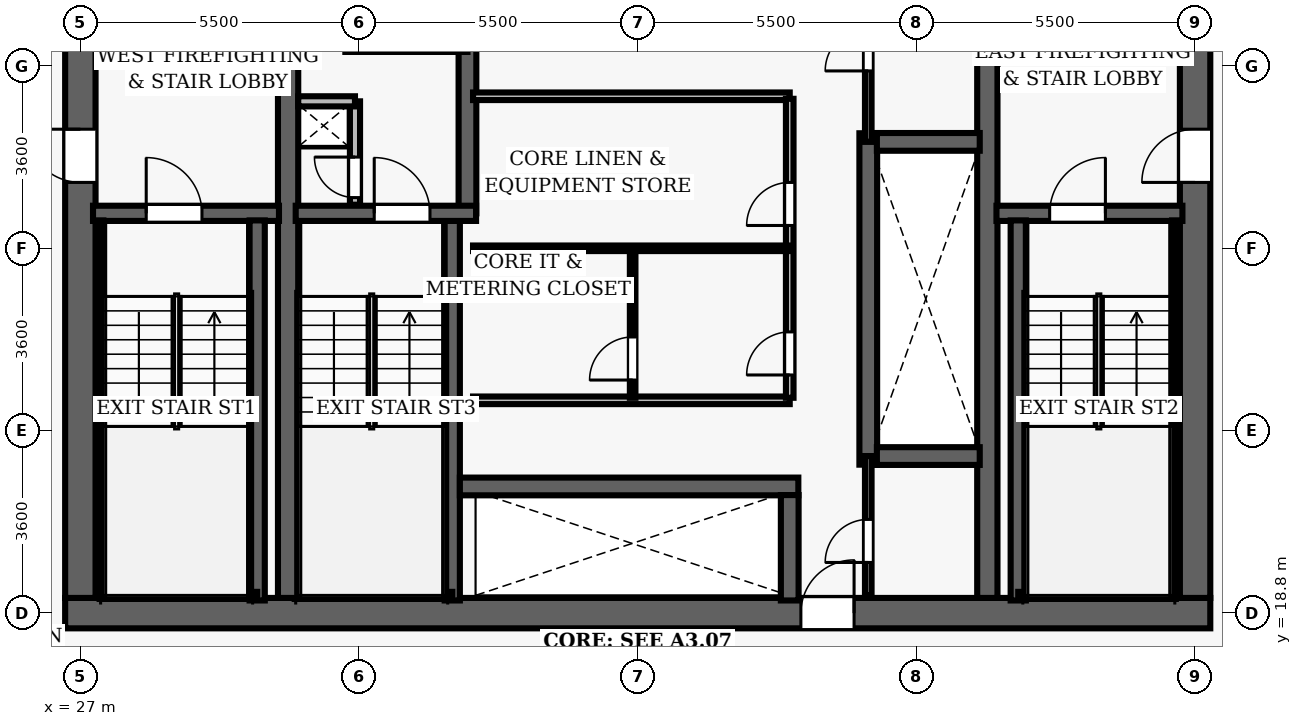
"""IFC4 building model, lengths in metres.
Left out: names, types, materials, properties, quantities, classifications, styles, units other than length and angle.
Written with IfcOpenShell. Run it as: python <this file> out.ifc"""

import sys

from ifc_helpers import new_model, si_unit, direction, frame, frame_2d, origin, place, context, subcontext, project, spatial, rectangle, extrude, element, fill, save


model = new_model("IFC4")
c1 = context("Model", 3, precision=1e-05, world=origin(), true_north=direction((0.0, 1.0)))
c2 = subcontext(c1, "Body", "Model", "MODEL_VIEW")
j1 = project(units=[si_unit("LENGTHUNIT", "METRE"), si_unit("PLANEANGLEUNIT", "RADIAN")], contexts=[c1])
p1 = place(None, origin())
s1 = spatial("IfcSite", under=j1, at=p1, CompositionType="ELEMENT")
p2 = place(p1, origin())
s2 = spatial("IfcBuilding", under=s1, at=p2, CompositionType="ELEMENT")
p3 = place(p2, frame((0.0, 0.0, 83.4)))
s3 = spatial("IfcBuildingStorey", under=s2, at=p3, CompositionType="ELEMENT", Elevation=83.4)
p4 = place(p3, frame((26.7, 18.8, 0.0), z_axis=(0.0, 0.0, 1.0), x_axis=(1.0, 0.0, 0.0)))
e1 = element("IfcWall", 1, at=p4, inside=s3, PredefinedType="SHEAR", context=c2, shape_type="SweptSolid", body=[
    extrude(rectangle(XDim=22.6, YDim=0.6, at=frame_2d((11.3, 0.0))), origin(), (0.0, 0.0, 1.0), 3.5),
])
p5 = place(p4, frame((14.52, 0.0, 0.0)))
e2 = element("IfcOpeningElement", 2, at=p5, cuts=e1, PredefinedType="OPENING", context=c2, shape_type="SweptSolid", body=[
    extrude(rectangle(XDim=1.05, YDim=2.15, at=frame_2d((0.525, 1.075))), frame((0.0, 0.31, 0.0), z_axis=(0.0, -1.0, 0.0), x_axis=(1.0, 0.0, 0.0)), (0.0, 0.0, 1.0), 0.62),
])
p6 = place(p3, frame((27.0, 19.1, 0.0), z_axis=(0.0, 0.0, 1.0), x_axis=(0.0, 1.0, 0.0)))
e3 = element("IfcWall", 3, at=p6, inside=s3, PredefinedType="SHEAR", context=c2, shape_type="SweptSolid", body=[
    extrude(rectangle(XDim=13.8, YDim=0.6, at=frame_2d((6.9, 0.0))), origin(), (0.0, 0.0, 1.0), 3.5),
])
p7 = place(p6, frame((8.2, 0.0, 0.0)))
e4 = element("IfcOpeningElement", 4, at=p7, cuts=e3, PredefinedType="OPENING", context=c2, shape_type="SweptSolid", body=[
    extrude(rectangle(XDim=1.05, YDim=2.15, at=frame_2d((0.525, 1.075))), frame((0.0, 0.31, 0.0), z_axis=(0.0, -1.0, 0.0), x_axis=(1.0, 0.0, 0.0)), (0.0, 0.0, 1.0), 0.62),
])
p8 = place(p3, frame((49.0, 19.1, 0.0), z_axis=(0.0, 0.0, 1.0), x_axis=(0.0, 1.0, 0.0)))
e5 = element("IfcWall", 5, at=p8, inside=s3, PredefinedType="SHEAR", context=c2, shape_type="SweptSolid", body=[
    extrude(rectangle(XDim=13.8, YDim=0.6, at=frame_2d((6.9, 0.0))), origin(), (0.0, 0.0, 1.0), 3.5),
])
p9 = place(p8, frame((8.2, 0.0, 0.0)))
e6 = element("IfcOpeningElement", 6, at=p9, cuts=e5, PredefinedType="OPENING", context=c2, shape_type="SweptSolid", body=[
    extrude(rectangle(XDim=1.05, YDim=2.15, at=frame_2d((0.525, 1.075))), frame((0.0, 0.31, 0.0), z_axis=(0.0, -1.0, 0.0), x_axis=(1.0, 0.0, 0.0)), (0.0, 0.0, 1.0), 0.62),
])
for number, where, z_axis, x_axis in (
    (7, (31.1, 19.1, 0.0), (0.0, 0.0, 1.0), (0.0, 1.0, 0.0)),
    (8, (44.9, 19.1, 0.0), (0.0, 0.0, 1.0), (0.0, 1.0, 0.0)),
):
    element("IfcWall", number, at=place(p3, frame(where, z_axis=z_axis, x_axis=x_axis)), inside=s3, PredefinedType="SHEAR", context=c2, shape_type="SweptSolid", body=[
        extrude(rectangle(XDim=13.8, YDim=0.4, at=frame_2d((6.9, 0.0))), origin(), (0.0, 0.0, 1.0), 3.5),
    ])
p10 = place(p3, frame((27.25, 26.69, 0.0), z_axis=(0.0, 0.0, 1.0), x_axis=(1.0, 0.0, 0.0)))
e9 = element("IfcWall", 9, at=p10, inside=s3, PredefinedType="SHEAR", context=c2, shape_type="SweptSolid", body=[
    extrude(rectangle(XDim=3.67, YDim=0.3, at=frame_2d((1.835, 0.0))), origin(), (0.0, 0.0, 1.0), 3.5),
])
p11 = place(p10, frame((1.05, 0.0, 0.0)))
e10 = element("IfcOpeningElement", 10, at=p11, cuts=e9, PredefinedType="OPENING", context=c2, shape_type="SweptSolid", body=[
    extrude(rectangle(XDim=1.1, YDim=2.15, at=frame_2d((0.55, 1.075))), frame((0.0, 0.16, 0.0), z_axis=(0.0, -1.0, 0.0), x_axis=(1.0, 0.0, 0.0)), (0.0, 0.0, 1.0), 0.32),
])
p12 = place(p3, frame((30.49, 19.05, 0.0), z_axis=(0.0, 0.0, 1.0), x_axis=(0.0, 1.0, 0.0)))
e11 = element("IfcWall", 11, at=p12, inside=s3, PredefinedType="SHEAR", context=c2, shape_type="SweptSolid", body=[
    extrude(rectangle(XDim=7.5, YDim=0.3, at=frame_2d((3.75, 0.0))), origin(), (0.0, 0.0, 1.0), 3.5),
])
p13 = place(p3, frame((27.395, 19.1, 0.0), z_axis=(0.0, 0.0, 1.0), x_axis=(0.0, 1.0, 0.0)))
e12 = element("IfcWall", 12, at=p13, inside=s3, PredefinedType="SHEAR", context=c2, shape_type="SweptSolid", body=[
    extrude(rectangle(XDim=7.45, YDim=0.12, at=frame_2d((3.725, 0.0))), origin(), (0.0, 0.0, 1.0), 3.5),
])
p14 = place(p3, frame((27.395, 19.16, 0.0), z_axis=(0.0, 0.0, 1.0), x_axis=(1.0, 0.0, 0.0)))
e13 = element("IfcWall", 13, at=p14, inside=s3, PredefinedType="SHEAR", context=c2, shape_type="SweptSolid", body=[
    extrude(rectangle(XDim=3.095, YDim=0.12, at=frame_2d((1.547, 0.0))), origin(), (0.0, 0.0, 1.0), 3.5),
])
p15 = place(p3, frame((45.08, 26.69, 0.0), z_axis=(0.0, 0.0, 1.0), x_axis=(1.0, 0.0, 0.0)))
e14 = element("IfcWall", 14, at=p15, inside=s3, PredefinedType="SHEAR", context=c2, shape_type="SweptSolid", body=[
    extrude(rectangle(XDim=3.67, YDim=0.3, at=frame_2d((1.835, 0.0))), origin(), (0.0, 0.0, 1.0), 3.5),
])
p16 = place(p15, frame((1.05, 0.0, 0.0)))
e15 = element("IfcOpeningElement", 15, at=p16, cuts=e14, PredefinedType="OPENING", context=c2, shape_type="SweptSolid", body=[
    extrude(rectangle(XDim=1.1, YDim=2.15, at=frame_2d((0.55, 1.075))), frame((0.0, 0.16, 0.0), z_axis=(0.0, -1.0, 0.0), x_axis=(1.0, 0.0, 0.0)), (0.0, 0.0, 1.0), 0.32),
])
p17 = place(p3, frame((45.51, 19.05, 0.0), z_axis=(0.0, 0.0, 1.0), x_axis=(0.0, 1.0, 0.0)))
e16 = element("IfcWall", 16, at=p17, inside=s3, PredefinedType="SHEAR", context=c2, shape_type="SweptSolid", body=[
    extrude(rectangle(XDim=7.5, YDim=0.3, at=frame_2d((3.75, 0.0))), origin(), (0.0, 0.0, 1.0), 3.5),
])
p18 = place(p3, frame((48.605, 19.1, 0.0), z_axis=(0.0, 0.0, 1.0), x_axis=(0.0, 1.0, 0.0)))
e17 = element("IfcWall", 17, at=p18, inside=s3, PredefinedType="SHEAR", context=c2, shape_type="SweptSolid", body=[
    extrude(rectangle(XDim=7.45, YDim=0.12, at=frame_2d((3.725, 0.0))), origin(), (0.0, 0.0, 1.0), 3.5),
])
p19 = place(p3, frame((45.51, 19.16, 0.0), z_axis=(0.0, 0.0, 1.0), x_axis=(1.0, 0.0, 0.0)))
e18 = element("IfcWall", 18, at=p19, inside=s3, PredefinedType="SHEAR", context=c2, shape_type="SweptSolid", body=[
    extrude(rectangle(XDim=3.095, YDim=0.12, at=frame_2d((1.547, 0.0))), origin(), (0.0, 0.0, 1.0), 3.5),
])
p20 = place(p3, frame((34.34, 19.05, 0.0), z_axis=(0.0, 0.0, 1.0), x_axis=(0.0, 1.0, 0.0)))
e19 = element("IfcWall", 19, at=p20, inside=s3, PredefinedType="SHEAR", context=c2, shape_type="SweptSolid", body=[
    extrude(rectangle(XDim=7.5, YDim=0.3, at=frame_2d((3.75, 0.0))), origin(), (0.0, 0.0, 1.0), 3.5),
])
p21 = place(p3, frame((34.64, 26.69, 0.0), z_axis=(0.0, 0.0, 1.0), x_axis=(0.0, 1.0, 0.0)))
e20 = element("IfcWall", 20, at=p21, inside=s3, PredefinedType="SHEAR", context=c2, shape_type="SweptSolid", body=[
    extrude(rectangle(XDim=6.26, YDim=0.35, at=frame_2d((3.13, 0.0))), origin(), (0.0, 0.0, 1.0), 3.5),
])
p22 = place(p3, frame((31.25, 26.69, 0.0), z_axis=(0.0, 0.0, 1.0), x_axis=(1.0, 0.0, 0.0)))
e21 = element("IfcWall", 21, at=p22, inside=s3, PredefinedType="SHEAR", context=c2, shape_type="SweptSolid", body=[
    extrude(rectangle(XDim=3.56, YDim=0.3, at=frame_2d((1.78, 0.0))), origin(), (0.0, 0.0, 1.0), 3.5),
])
p23 = place(p22, frame((1.55, 0.0, 0.0)))
e22 = element("IfcOpeningElement", 22, at=p23, cuts=e21, PredefinedType="OPENING", context=c2, shape_type="SweptSolid", body=[
    extrude(rectangle(XDim=1.1, YDim=2.15, at=frame_2d((0.55, 1.075))), frame((0.0, 0.16, 0.0), z_axis=(0.0, -1.0, 0.0), x_axis=(1.0, 0.0, 0.0)), (0.0, 0.0, 1.0), 0.32),
])
p24 = place(p3, frame((31.3, 19.16, 0.0), z_axis=(0.0, 0.0, 1.0), x_axis=(1.0, 0.0, 0.0)))
e23 = element("IfcWall", 23, at=p24, inside=s3, PredefinedType="SHEAR", context=c2, shape_type="SweptSolid", body=[
    extrude(rectangle(XDim=3.04, YDim=0.12, at=frame_2d((1.52, 0.0))), origin(), (0.0, 0.0, 1.0), 3.5),
])
p25 = place(p3, frame((32.42, 26.86, 0.0), z_axis=(0.0, 0.0, 1.0), x_axis=(0.0, 1.0, 0.0)))
e24 = element("IfcWall", 24, at=p25, inside=s3, PredefinedType="PARTITIONING", context=c2, shape_type="SweptSolid", body=[
    extrude(rectangle(XDim=2.04, YDim=0.2, at=frame_2d((1.02, 0.0))), origin(), (0.0, 0.0, 1.0), 2.6),
])
p26 = place(p25, frame((0.14, 0.0, 0.0)))
e25 = element("IfcOpeningElement", 25, at=p26, cuts=e24, PredefinedType="OPENING", context=c2, shape_type="SweptSolid", body=[
    extrude(rectangle(XDim=0.8, YDim=2.05, at=frame_2d((0.4, 1.025))), frame((0.0, 0.11, 0.0), z_axis=(0.0, -1.0, 0.0), x_axis=(1.0, 0.0, 0.0)), (0.0, 0.0, 1.0), 0.22),
])
p27 = place(p3, frame((31.3, 28.9, 0.0), z_axis=(0.0, 0.0, 1.0), x_axis=(1.0, 0.0, 0.0)))
e26 = element("IfcWall", 26, at=p27, inside=s3, PredefinedType="PARTITIONING", context=c2, shape_type="SweptSolid", body=[
    extrude(rectangle(XDim=1.12, YDim=0.2, at=frame_2d((0.56, 0.0))), origin(), (0.0, 0.0, 1.0), 2.6),
])
p28 = place(p3, frame((42.55, 21.73, 0.0), z_axis=(0.0, 0.0, 1.0), x_axis=(0.0, 1.0, 0.0)))
e27 = element("IfcWall", 27, at=p28, inside=s3, PredefinedType="SHEAR", context=c2, shape_type="SweptSolid", body=[
    extrude(rectangle(XDim=6.54, YDim=0.35, at=frame_2d((3.27, 0.0))), origin(), (0.0, 0.0, 1.0), 2.6),
])
for number, where, z_axis, x_axis in (
    (28, (42.72, 21.9, 0.0), (0.0, 0.0, 1.0), (1.0, 0.0, 0.0)),
    (29, (42.72, 28.1, 0.0), (0.0, 0.0, 1.0), (1.0, 0.0, 0.0)),
):
    element("IfcWall", number, at=place(p3, frame(where, z_axis=z_axis, x_axis=x_axis)), inside=s3, PredefinedType="SHEAR", context=c2, shape_type="SweptSolid", body=[
        extrude(rectangle(XDim=2.03, YDim=0.35, at=frame_2d((1.015, 0.0))), origin(), (0.0, 0.0, 1.0), 2.6),
    ])
p29 = place(p3, frame((34.49, 21.3, 0.0), z_axis=(0.0, 0.0, 1.0), x_axis=(1.0, 0.0, 0.0)))
e30 = element("IfcWall", 30, at=p29, inside=s3, PredefinedType="SHEAR", context=c2, shape_type="SweptSolid", body=[
    extrude(rectangle(XDim=6.68, YDim=0.35, at=frame_2d((3.34, 0.0))), origin(), (0.0, 0.0, 1.0), 2.6),
])
p30 = place(p3, frame((41.0, 19.05, 0.0), z_axis=(0.0, 0.0, 1.0), x_axis=(0.0, 1.0, 0.0)))
e31 = element("IfcWall", 31, at=p30, inside=s3, PredefinedType="SHEAR", context=c2, shape_type="SweptSolid", body=[
    extrude(rectangle(XDim=2.08, YDim=0.35, at=frame_2d((1.04, 0.0))), origin(), (0.0, 0.0, 1.0), 2.6),
])
for number, where, z_axis, x_axis in (
    (32, (34.75, 29.0, 0.0), (0.0, 0.0, 1.0), (1.0, 0.0, 0.0)),
    (33, (34.75, 23.0, 0.0), (0.0, 0.0, 1.0), (1.0, 0.0, 0.0)),
):
    element("IfcWall", number, at=place(p3, frame(where, z_axis=z_axis, x_axis=x_axis)), inside=s3, PredefinedType="PARTITIONING", context=c2, shape_type="SweptSolid", body=[
        extrude(rectangle(XDim=6.25, YDim=0.15, at=frame_2d((3.125, 0.0))), origin(), (0.0, 0.0, 1.0), 2.6),
    ])
p31 = place(p3, frame((41.0, 23.05, 0.0), z_axis=(0.0, 0.0, 1.0), x_axis=(0.0, 1.0, 0.0)))
e34 = element("IfcWall", 34, at=p31, inside=s3, PredefinedType="PARTITIONING", context=c2, shape_type="SweptSolid", body=[
    extrude(rectangle(XDim=5.9, YDim=0.15, at=frame_2d((2.95, 0.0))), origin(), (0.0, 0.0, 1.0), 2.6),
])
p32 = place(p31, frame((3.4, 0.0, 0.0)))
e35 = element("IfcOpeningElement", 35, at=p32, cuts=e34, PredefinedType="OPENING", context=c2, shape_type="SweptSolid", body=[
    extrude(rectangle(XDim=0.85, YDim=2.1, at=frame_2d((0.425, 1.05))), frame((0.0, 0.085, 0.0), z_axis=(0.0, -1.0, 0.0), x_axis=(1.0, 0.0, 0.0)), (0.0, 0.0, 1.0), 0.17),
])
p33 = place(p31, frame((0.45, 0.0, 0.0)))
e36 = element("IfcOpeningElement", 36, at=p33, cuts=e34, PredefinedType="OPENING", context=c2, shape_type="SweptSolid", body=[
    extrude(rectangle(XDim=0.85, YDim=2.1, at=frame_2d((0.425, 1.05))), frame((0.0, 0.085, 0.0), z_axis=(0.0, -1.0, 0.0), x_axis=(1.0, 0.0, 0.0)), (0.0, 0.0, 1.0), 0.17),
])
p34 = place(p3, frame((34.75, 26.0, 0.0), z_axis=(0.0, 0.0, 1.0), x_axis=(1.0, 0.0, 0.0)))
e37 = element("IfcWall", 37, at=p34, inside=s3, PredefinedType="PARTITIONING", context=c2, shape_type="SweptSolid", body=[
    extrude(rectangle(XDim=6.25, YDim=0.11, at=frame_2d((3.125, 0.0))), origin(), (0.0, 0.0, 1.0), 2.6),
])
p35 = place(p3, frame((37.9, 23.05, 0.0), z_axis=(0.0, 0.0, 1.0), x_axis=(0.0, 1.0, 0.0)))
e38 = element("IfcWall", 38, at=p35, inside=s3, PredefinedType="PARTITIONING", context=c2, shape_type="SweptSolid", body=[
    extrude(rectangle(XDim=2.95, YDim=0.11, at=frame_2d((1.475, 0.0))), origin(), (0.0, 0.0, 1.0), 2.6),
])
p36 = place(p35, frame((0.35, 0.0, 0.0)))
e39 = element("IfcOpeningElement", 39, at=p36, cuts=e38, PredefinedType="OPENING", context=c2, shape_type="SweptSolid", body=[
    extrude(rectangle(XDim=0.85, YDim=2.1, at=frame_2d((0.425, 1.05))), frame((0.0, 0.065, 0.0), z_axis=(0.0, -1.0, 0.0), x_axis=(1.0, 0.0, 0.0)), (0.0, 0.0, 1.0), 0.13),
])
p37 = place(p3, frame((42.55, 28.1, 0.0), z_axis=(0.0, 0.0, 1.0), x_axis=(0.0, 1.0, 0.0)))
e40 = element("IfcWall", 40, at=p37, inside=s3, PredefinedType="PARTITIONING", context=c2, shape_type="SweptSolid", body=[
    extrude(rectangle(XDim=4.75, YDim=0.13, at=frame_2d((2.375, 0.0))), origin(), (0.0, 0.0, 1.0), 2.6),
])
p38 = place(p37, frame((1.4, 0.0, 0.0)))
e41 = element("IfcOpeningElement", 41, at=p38, cuts=e40, PredefinedType="OPENING", context=c2, shape_type="SweptSolid", body=[
    extrude(rectangle(XDim=0.85, YDim=2.1, at=frame_2d((0.425, 1.05))), frame((0.0, 0.075, 0.0), z_axis=(0.0, -1.0, 0.0), x_axis=(1.0, 0.0, 0.0)), (0.0, 0.0, 1.0), 0.15),
])
p39 = place(p3, frame((42.55, 19.15, 0.0), z_axis=(0.0, 0.0, 1.0), x_axis=(0.0, 1.0, 0.0)))
e42 = element("IfcWall", 42, at=p39, inside=s3, PredefinedType="PARTITIONING", context=c2, shape_type="SweptSolid", body=[
    extrude(rectangle(XDim=2.75, YDim=0.13, at=frame_2d((1.375, 0.0))), origin(), (0.0, 0.0, 1.0), 2.6),
])
p40 = place(p39, frame((0.65, 0.0, 0.0)))
e43 = element("IfcOpeningElement", 43, at=p40, cuts=e42, PredefinedType="OPENING", context=c2, shape_type="SweptSolid", body=[
    extrude(rectangle(XDim=0.85, YDim=2.1, at=frame_2d((0.425, 1.05))), frame((0.0, 0.075, 0.0), z_axis=(0.0, -1.0, 0.0), x_axis=(1.0, 0.0, 0.0)), (0.0, 0.0, 1.0), 0.15),
])
p41 = place(p11, origin())
e44 = element("IfcDoor", 44, at=p41, inside=s3, OperationType="SINGLE_SWING_LEFT", PredefinedType="DOOR", context=c2, shape_type="SweptSolid", body=[
    extrude(rectangle(XDim=1.1, YDim=2.15, at=frame_2d((0.55, 1.075))), frame((0.0, 0.025, 0.0), z_axis=(0.0, -1.0, 0.0), x_axis=(1.0, 0.0, 0.0)), (0.0, 0.0, 1.0), 0.05),
])
fill(e10, e44)
p42 = place(p7, origin())
e45 = element("IfcDoor", 45, at=p42, inside=s3, OperationType="SINGLE_SWING_RIGHT", PredefinedType="DOOR", context=c2, shape_type="SweptSolid", body=[
    extrude(rectangle(XDim=1.05, YDim=2.15, at=frame_2d((0.525, 1.075))), frame((0.0, 0.025, 0.0), z_axis=(0.0, -1.0, 0.0), x_axis=(1.0, 0.0, 0.0)), (0.0, 0.0, 1.0), 0.05),
])
fill(e4, e45)
p43 = place(p16, origin())
e46 = element("IfcDoor", 46, at=p43, inside=s3, OperationType="SINGLE_SWING_RIGHT", PredefinedType="DOOR", context=c2, shape_type="SweptSolid", body=[
    extrude(rectangle(XDim=1.1, YDim=2.15, at=frame_2d((0.55, 1.075))), frame((0.0, 0.025, 0.0), z_axis=(0.0, -1.0, 0.0), x_axis=(1.0, 0.0, 0.0)), (0.0, 0.0, 1.0), 0.05),
])
fill(e15, e46)
p44 = place(p9, origin())
e47 = element("IfcDoor", 47, at=p44, inside=s3, OperationType="SINGLE_SWING_LEFT", PredefinedType="DOOR", context=c2, shape_type="SweptSolid", body=[
    extrude(rectangle(XDim=1.05, YDim=2.15, at=frame_2d((0.525, 1.075))), frame((0.0, 0.025, 0.0), z_axis=(0.0, -1.0, 0.0), x_axis=(1.0, 0.0, 0.0)), (0.0, 0.0, 1.0), 0.05),
])
fill(e6, e47)
p45 = place(p23, origin())
e48 = element("IfcDoor", 48, at=p45, inside=s3, OperationType="SINGLE_SWING_LEFT", PredefinedType="DOOR", context=c2, shape_type="SweptSolid", body=[
    extrude(rectangle(XDim=1.1, YDim=2.15, at=frame_2d((0.55, 1.075))), frame((0.0, 0.025, 0.0), z_axis=(0.0, -1.0, 0.0), x_axis=(1.0, 0.0, 0.0)), (0.0, 0.0, 1.0), 0.05),
])
fill(e22, e48)
p46 = place(p26, origin())
e49 = element("IfcDoor", 49, at=p46, inside=s3, OperationType="SINGLE_SWING_RIGHT", PredefinedType="DOOR", context=c2, shape_type="SweptSolid", body=[
    extrude(rectangle(XDim=0.8, YDim=2.05, at=frame_2d((0.4, 1.025))), frame((0.0, 0.025, 0.0), z_axis=(0.0, -1.0, 0.0), x_axis=(1.0, 0.0, 0.0)), (0.0, 0.0, 1.0), 0.05),
])
fill(e25, e49)
p47 = place(p5, origin())
e50 = element("IfcDoor", 50, at=p47, inside=s3, OperationType="SINGLE_SWING_RIGHT", PredefinedType="DOOR", context=c2, shape_type="SweptSolid", body=[
    extrude(rectangle(XDim=1.05, YDim=2.15, at=frame_2d((0.525, 1.075))), frame((0.0, 0.025, 0.0), z_axis=(0.0, -1.0, 0.0), x_axis=(1.0, 0.0, 0.0)), (0.0, 0.0, 1.0), 0.05),
])
fill(e2, e50)
p48 = place(p32, origin())
e51 = element("IfcDoor", 51, at=p48, inside=s3, OperationType="SINGLE_SWING_LEFT", PredefinedType="DOOR", context=c2, shape_type="SweptSolid", body=[
    extrude(rectangle(XDim=0.85, YDim=2.1, at=frame_2d((0.425, 1.05))), frame((0.0, 0.025, 0.0), z_axis=(0.0, -1.0, 0.0), x_axis=(1.0, 0.0, 0.0)), (0.0, 0.0, 1.0), 0.05),
])
fill(e35, e51)
p49 = place(p33, origin())
e52 = element("IfcDoor", 52, at=p49, inside=s3, OperationType="SINGLE_SWING_LEFT", PredefinedType="DOOR", context=c2, shape_type="SweptSolid", body=[
    extrude(rectangle(XDim=0.85, YDim=2.1, at=frame_2d((0.425, 1.05))), frame((0.0, 0.025, 0.0), z_axis=(0.0, -1.0, 0.0), x_axis=(1.0, 0.0, 0.0)), (0.0, 0.0, 1.0), 0.05),
])
fill(e36, e52)
p50 = place(p36, origin())
e53 = element("IfcDoor", 53, at=p50, inside=s3, OperationType="SINGLE_SWING_LEFT", PredefinedType="DOOR", context=c2, shape_type="SweptSolid", body=[
    extrude(rectangle(XDim=0.85, YDim=2.1, at=frame_2d((0.425, 1.05))), frame((0.0, 0.025, 0.0), z_axis=(0.0, -1.0, 0.0), x_axis=(1.0, 0.0, 0.0)), (0.0, 0.0, 1.0), 0.05),
])
fill(e39, e53)
p51 = place(p38, origin())
e54 = element("IfcDoor", 54, at=p51, inside=s3, OperationType="SINGLE_SWING_LEFT", PredefinedType="DOOR", context=c2, shape_type="SweptSolid", body=[
    extrude(rectangle(XDim=0.85, YDim=2.1, at=frame_2d((0.425, 1.05))), frame((0.0, 0.025, 0.0), z_axis=(0.0, -1.0, 0.0), x_axis=(1.0, 0.0, 0.0)), (0.0, 0.0, 1.0), 0.05),
])
fill(e41, e54)
p52 = place(p40, origin())
e55 = element("IfcDoor", 55, at=p52, inside=s3, OperationType="SINGLE_SWING_LEFT", PredefinedType="DOOR", context=c2, shape_type="SweptSolid", body=[
    extrude(rectangle(XDim=0.85, YDim=2.1, at=frame_2d((0.425, 1.05))), frame((0.0, 0.025, 0.0), z_axis=(0.0, -1.0, 0.0), x_axis=(1.0, 0.0, 0.0)), (0.0, 0.0, 1.0), 0.05),
])
fill(e43, e55)
save(model, sys.argv[1])
